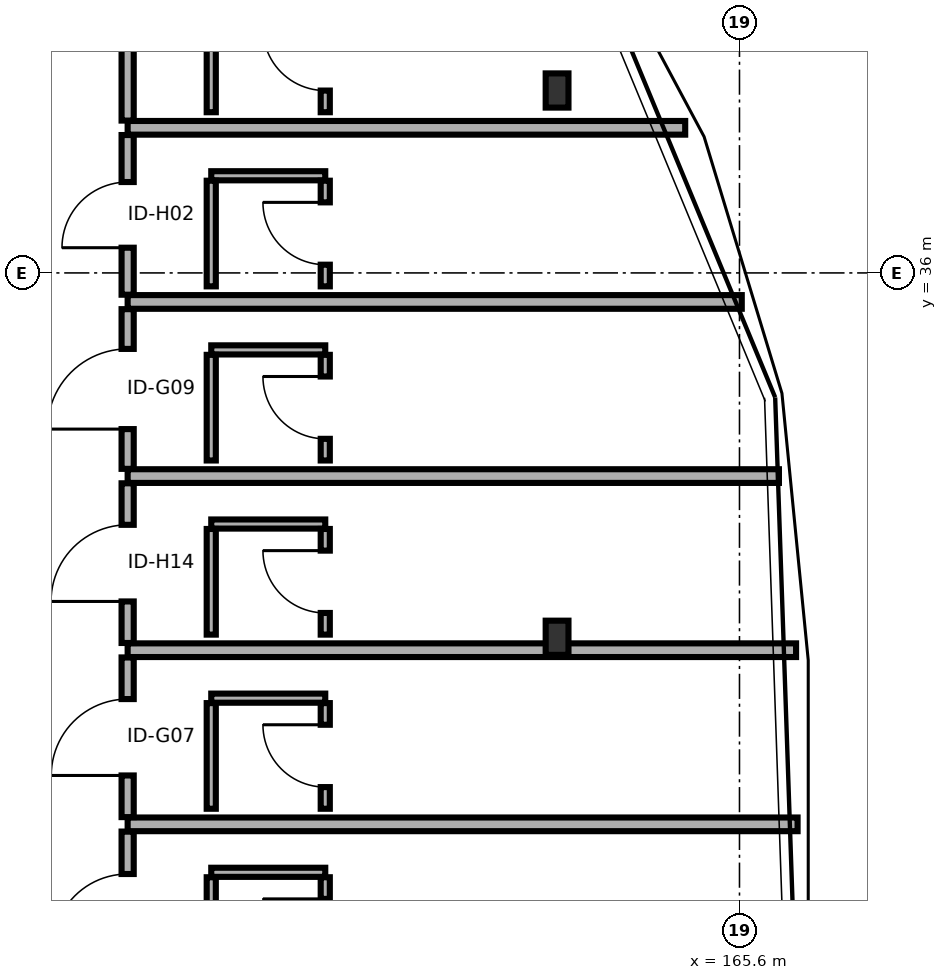
"""IFC4 building model, lengths in metres.
Left out: names, types, materials, properties, quantities, classifications, styles, units other than length and angle.
Written with IfcOpenShell. Run it as: python <this file> out.ifc"""

import sys

from ifc_helpers import new_model, si_unit, direction, frame, frame_2d, origin, origin_2d, place, context, subcontext, project, spatial, rectangle, i_section, extrude, element, fill, save


model = new_model("IFC4")
c1 = context("Model", 3, precision=1e-05, world=origin(), true_north=direction((0.0, 1.0)))
c2 = subcontext(c1, "Body", "Model", "MODEL_VIEW")
j1 = project(units=[si_unit("LENGTHUNIT", "METRE"), si_unit("PLANEANGLEUNIT", "RADIAN")], contexts=[c1])
p1 = place(None, origin())
s1 = spatial("IfcSite", under=j1, at=p1, CompositionType="ELEMENT")
p2 = place(p1, origin())
s2 = spatial("IfcBuilding", under=s1, at=p2, CompositionType="ELEMENT")
p3 = place(p2, frame((0.0, 0.0, 28.3)))
s3 = spatial("IfcBuildingStorey", under=s2, at=p3, CompositionType="ELEMENT", Elevation=28.3)
for number, where, z_axis, x_axis in (
    (1, (163.2, 31.2, 0.0), (0.0, 0.0, 1.0), (1.0, 0.0, 0.0)),
    (2, (163.2, 38.4, 0.0), (0.0, 0.0, 1.0), (1.0, 0.0, 0.0)),
):
    element("IfcColumn", number, at=place(p3, frame(where, z_axis=z_axis, x_axis=x_axis)), inside=s3, PredefinedType="COLUMN", context=c2, shape_type="SweptSolid", body=[
        extrude(i_section(OverallWidth=0.3, OverallDepth=0.45, WebThickness=0.014, FlangeThickness=0.026, FilletRadius=0.027, at=origin_2d()), origin(), (0.0, 0.0, 1.0), 3.4),
    ])
p4 = place(p3, frame((157.55, 26.55, 0.0), z_axis=(0.0, 0.0, 1.0), x_axis=(0.0, 1.0, 0.0)))
e3 = element("IfcWall", 3, at=p4, inside=s3, PredefinedType="PARTITIONING", context=c2, shape_type="SweptSolid", body=[
    extrude(rectangle(XDim=2.101, YDim=0.16, at=frame_2d((1.05, 0.0))), origin(), (0.0, 0.0, 1.0), 3.175),
])
p5 = place(p4, frame((0.559, 0.0, 0.0)))
e4 = element("IfcOpeningElement", 4, at=p5, cuts=e3, PredefinedType="OPENING", context=c2, shape_type="SweptSolid", body=[
    extrude(rectangle(XDim=0.984, YDim=2.07, at=frame_2d((0.492, 1.035))), frame((0.0, 0.09, 0.0), z_axis=(0.0, -1.0, 0.0), x_axis=(1.0, 0.0, 0.0)), (0.0, 0.0, 1.0), 0.18),
])
p6 = place(p3, frame((158.65, 28.115, 0.0), z_axis=(0.0, 0.0, 1.0), x_axis=(1.0, 0.0, 0.0)))
e5 = element("IfcWall", 5, at=p6, inside=s3, PredefinedType="PARTITIONING", context=c2, shape_type="SweptSolid", body=[
    extrude(rectangle(XDim=1.5, YDim=0.12, at=frame_2d((0.75, 0.0))), origin(), (0.0, 0.0, 1.0), 3.175),
])
p7 = place(p3, frame((158.65, 26.659, 0.0), z_axis=(0.0, 0.0, 1.0), x_axis=(0.0, 1.0, 0.0)))
e6 = element("IfcWall", 6, at=p7, inside=s3, PredefinedType="PARTITIONING", context=c2, shape_type="SweptSolid", body=[
    extrude(rectangle(XDim=1.39, YDim=0.12, at=frame_2d((0.695, 0.0))), origin(), (0.0, 0.0, 1.0), 3.175),
])
p8 = place(p3, frame((160.15, 26.659, 0.0), z_axis=(0.0, 0.0, 1.0), x_axis=(0.0, 1.0, 0.0)))
e7 = element("IfcWall", 7, at=p8, inside=s3, PredefinedType="PARTITIONING", context=c2, shape_type="SweptSolid", body=[
    extrude(rectangle(XDim=1.39, YDim=0.12, at=frame_2d((0.695, 0.0))), origin(), (0.0, 0.0, 1.0), 3.175),
])
p9 = place(p8, frame((0.285, 0.0, 0.0)))
e8 = element("IfcOpeningElement", 8, at=p9, cuts=e7, PredefinedType="OPENING", context=c2, shape_type="SweptSolid", body=[
    extrude(rectangle(XDim=0.82, YDim=2.08, at=frame_2d((0.41, 1.04))), frame((0.0, 0.07, 0.0), z_axis=(0.0, -1.0, 0.0), x_axis=(1.0, 0.0, 0.0)), (0.0, 0.0, 1.0), 0.14),
])
p10 = place(p3, frame((157.55, 28.746, 0.0), z_axis=(0.0, 0.0, 1.0), x_axis=(1.0, 0.0, 0.0)))
e9 = element("IfcWall", 9, at=p10, inside=s3, PredefinedType="PARTITIONING", context=c2, shape_type="SweptSolid", body=[
    extrude(rectangle(XDim=8.814, YDim=0.18, at=frame_2d((4.407, 0.0))), origin(), (0.0, 0.0, 1.0), 2.66),
])
p11 = place(p3, frame((157.55, 28.841, 0.0), z_axis=(0.0, 0.0, 1.0), x_axis=(0.0, 1.0, 0.0)))
e10 = element("IfcWall", 10, at=p11, inside=s3, PredefinedType="PARTITIONING", context=c2, shape_type="SweptSolid", body=[
    extrude(rectangle(XDim=2.101, YDim=0.16, at=frame_2d((1.05, 0.0))), origin(), (0.0, 0.0, 1.0), 3.175),
])
p12 = place(p11, frame((0.548, 0.0, 0.0)))
e11 = element("IfcOpeningElement", 11, at=p12, cuts=e10, PredefinedType="OPENING", context=c2, shape_type="SweptSolid", body=[
    extrude(rectangle(XDim=1.005, YDim=2.05, at=frame_2d((0.502, 1.025))), frame((0.0, 0.09, 0.0), z_axis=(0.0, -1.0, 0.0), x_axis=(1.0, 0.0, 0.0)), (0.0, 0.0, 1.0), 0.18),
])
p13 = place(p3, frame((158.65, 30.406, 0.0), z_axis=(0.0, 0.0, 1.0), x_axis=(1.0, 0.0, 0.0)))
e12 = element("IfcWall", 12, at=p13, inside=s3, PredefinedType="PARTITIONING", context=c2, shape_type="SweptSolid", body=[
    extrude(rectangle(XDim=1.5, YDim=0.12, at=frame_2d((0.75, 0.0))), origin(), (0.0, 0.0, 1.0), 3.175),
])
p14 = place(p3, frame((158.65, 28.95, 0.0), z_axis=(0.0, 0.0, 1.0), x_axis=(0.0, 1.0, 0.0)))
e13 = element("IfcWall", 13, at=p14, inside=s3, PredefinedType="PARTITIONING", context=c2, shape_type="SweptSolid", body=[
    extrude(rectangle(XDim=1.39, YDim=0.12, at=frame_2d((0.695, 0.0))), origin(), (0.0, 0.0, 1.0), 3.175),
])
p15 = place(p3, frame((160.15, 28.95, 0.0), z_axis=(0.0, 0.0, 1.0), x_axis=(0.0, 1.0, 0.0)))
e14 = element("IfcWall", 14, at=p15, inside=s3, PredefinedType="PARTITIONING", context=c2, shape_type="SweptSolid", body=[
    extrude(rectangle(XDim=1.39, YDim=0.12, at=frame_2d((0.695, 0.0))), origin(), (0.0, 0.0, 1.0), 3.175),
])
p16 = place(p15, frame((0.285, 0.0, 0.0)))
e15 = element("IfcOpeningElement", 15, at=p16, cuts=e14, PredefinedType="OPENING", context=c2, shape_type="SweptSolid", body=[
    extrude(rectangle(XDim=0.82, YDim=2.08, at=frame_2d((0.41, 1.04))), frame((0.0, 0.07, 0.0), z_axis=(0.0, -1.0, 0.0), x_axis=(1.0, 0.0, 0.0)), (0.0, 0.0, 1.0), 0.14),
])
p17 = place(p3, frame((157.55, 31.036, 0.0), z_axis=(0.0, 0.0, 1.0), x_axis=(1.0, 0.0, 0.0)))
e16 = element("IfcWall", 16, at=p17, inside=s3, PredefinedType="PARTITIONING", context=c2, shape_type="SweptSolid", body=[
    extrude(rectangle(XDim=8.794, YDim=0.18, at=frame_2d((4.397, 0.0))), origin(), (0.0, 0.0, 1.0), 2.66),
])
p18 = place(p3, frame((157.55, 31.131, 0.0), z_axis=(0.0, 0.0, 1.0), x_axis=(0.0, 1.0, 0.0)))
e17 = element("IfcWall", 17, at=p18, inside=s3, PredefinedType="PARTITIONING", context=c2, shape_type="SweptSolid", body=[
    extrude(rectangle(XDim=2.101, YDim=0.16, at=frame_2d((1.051, 0.0))), origin(), (0.0, 0.0, 1.0), 2.71),
])
p19 = place(p18, frame((0.546, 0.0, 0.0)))
e18 = element("IfcOpeningElement", 18, at=p19, cuts=e17, PredefinedType="OPENING", context=c2, shape_type="SweptSolid", body=[
    extrude(rectangle(XDim=1.008, YDim=2.13, at=frame_2d((0.504, 1.065))), frame((0.0, 0.09, 0.0), z_axis=(0.0, -1.0, 0.0), x_axis=(1.0, 0.0, 0.0)), (0.0, 0.0, 1.0), 0.18),
])
p20 = place(p3, frame((158.65, 32.696, 0.0), z_axis=(0.0, 0.0, 1.0), x_axis=(1.0, 0.0, 0.0)))
e19 = element("IfcWall", 19, at=p20, inside=s3, PredefinedType="PARTITIONING", context=c2, shape_type="SweptSolid", body=[
    extrude(rectangle(XDim=1.5, YDim=0.12, at=frame_2d((0.75, 0.0))), origin(), (0.0, 0.0, 1.0), 3.175),
])
p21 = place(p3, frame((158.65, 31.241, 0.0), z_axis=(0.0, 0.0, 1.0), x_axis=(0.0, 1.0, 0.0)))
e20 = element("IfcWall", 20, at=p21, inside=s3, PredefinedType="PARTITIONING", context=c2, shape_type="SweptSolid", body=[
    extrude(rectangle(XDim=1.39, YDim=0.12, at=frame_2d((0.695, 0.0))), origin(), (0.0, 0.0, 1.0), 2.71),
])
p22 = place(p3, frame((160.15, 31.241, 0.0), z_axis=(0.0, 0.0, 1.0), x_axis=(0.0, 1.0, 0.0)))
e21 = element("IfcWall", 21, at=p22, inside=s3, PredefinedType="PARTITIONING", context=c2, shape_type="SweptSolid", body=[
    extrude(rectangle(XDim=1.39, YDim=0.12, at=frame_2d((0.695, 0.0))), origin(), (0.0, 0.0, 1.0), 2.71),
])
p23 = place(p22, frame((0.285, 0.0, 0.0)))
e22 = element("IfcOpeningElement", 22, at=p23, cuts=e21, PredefinedType="OPENING", context=c2, shape_type="SweptSolid", body=[
    extrude(rectangle(XDim=0.82, YDim=2.08, at=frame_2d((0.41, 1.04))), frame((0.0, 0.07, 0.0), z_axis=(0.0, -1.0, 0.0), x_axis=(1.0, 0.0, 0.0)), (0.0, 0.0, 1.0), 0.14),
])
p24 = place(p3, frame((157.55, 33.327, 0.0), z_axis=(0.0, 0.0, 1.0), x_axis=(1.0, 0.0, 0.0)))
e23 = element("IfcWall", 23, at=p24, inside=s3, PredefinedType="PARTITIONING", context=c2, shape_type="SweptSolid", body=[
    extrude(rectangle(XDim=8.569, YDim=0.18, at=frame_2d((4.284, 0.0))), origin(), (0.0, 0.0, 1.0), 2.66),
])
p25 = place(p3, frame((157.55, 33.422, 0.0), z_axis=(0.0, 0.0, 1.0), x_axis=(0.0, 1.0, 0.0)))
e24 = element("IfcWall", 24, at=p25, inside=s3, PredefinedType="PARTITIONING", context=c2, shape_type="SweptSolid", body=[
    extrude(rectangle(XDim=2.101, YDim=0.16, at=frame_2d((1.05, 0.0))), origin(), (0.0, 0.0, 1.0), 3.175),
])
p26 = place(p25, frame((0.523, 0.0, 0.0)))
e25 = element("IfcOpeningElement", 25, at=p26, cuts=e24, PredefinedType="OPENING", context=c2, shape_type="SweptSolid", body=[
    extrude(rectangle(XDim=1.055, YDim=2.05, at=frame_2d((0.527, 1.025))), frame((0.0, 0.09, 0.0), z_axis=(0.0, -1.0, 0.0), x_axis=(1.0, 0.0, 0.0)), (0.0, 0.0, 1.0), 0.18),
])
p27 = place(p3, frame((158.65, 34.987, 0.0), z_axis=(0.0, 0.0, 1.0), x_axis=(1.0, 0.0, 0.0)))
e26 = element("IfcWall", 26, at=p27, inside=s3, PredefinedType="PARTITIONING", context=c2, shape_type="SweptSolid", body=[
    extrude(rectangle(XDim=1.5, YDim=0.12, at=frame_2d((0.75, 0.0))), origin(), (0.0, 0.0, 1.0), 3.175),
])
p28 = place(p3, frame((158.65, 33.532, 0.0), z_axis=(0.0, 0.0, 1.0), x_axis=(0.0, 1.0, 0.0)))
e27 = element("IfcWall", 27, at=p28, inside=s3, PredefinedType="PARTITIONING", context=c2, shape_type="SweptSolid", body=[
    extrude(rectangle(XDim=1.39, YDim=0.12, at=frame_2d((0.695, 0.0))), origin(), (0.0, 0.0, 1.0), 3.175),
])
p29 = place(p3, frame((160.15, 33.532, 0.0), z_axis=(0.0, 0.0, 1.0), x_axis=(0.0, 1.0, 0.0)))
e28 = element("IfcWall", 28, at=p29, inside=s3, PredefinedType="PARTITIONING", context=c2, shape_type="SweptSolid", body=[
    extrude(rectangle(XDim=1.39, YDim=0.12, at=frame_2d((0.695, 0.0))), origin(), (0.0, 0.0, 1.0), 3.175),
])
p30 = place(p29, frame((0.285, 0.0, 0.0)))
e29 = element("IfcOpeningElement", 29, at=p30, cuts=e28, PredefinedType="OPENING", context=c2, shape_type="SweptSolid", body=[
    extrude(rectangle(XDim=0.82, YDim=2.08, at=frame_2d((0.41, 1.04))), frame((0.0, 0.07, 0.0), z_axis=(0.0, -1.0, 0.0), x_axis=(1.0, 0.0, 0.0)), (0.0, 0.0, 1.0), 0.14),
])
p31 = place(p3, frame((157.55, 35.618, 0.0), z_axis=(0.0, 0.0, 1.0), x_axis=(1.0, 0.0, 0.0)))
e30 = element("IfcWall", 30, at=p31, inside=s3, PredefinedType="PARTITIONING", context=c2, shape_type="SweptSolid", body=[
    extrude(rectangle(XDim=8.08, YDim=0.18, at=frame_2d((4.04, 0.0))), origin(), (0.0, 0.0, 1.0), 2.66),
])
p32 = place(p3, frame((157.55, 35.713, 0.0), z_axis=(0.0, 0.0, 1.0), x_axis=(0.0, 1.0, 0.0)))
e31 = element("IfcWall", 31, at=p32, inside=s3, PredefinedType="PARTITIONING", context=c2, shape_type="SweptSolid", body=[
    extrude(rectangle(XDim=2.101, YDim=0.16, at=frame_2d((1.051, 0.0))), origin(), (0.0, 0.0, 1.0), 3.175),
])
p33 = place(p32, frame((0.618, 0.0, 0.0)))
e32 = element("IfcOpeningElement", 32, at=p33, cuts=e31, PredefinedType="OPENING", context=c2, shape_type="SweptSolid", body=[
    extrude(rectangle(XDim=0.864, YDim=2.13, at=frame_2d((0.432, 1.065))), frame((0.0, 0.09, 0.0), z_axis=(0.0, -1.0, 0.0), x_axis=(1.0, 0.0, 0.0)), (0.0, 0.0, 1.0), 0.18),
])
p34 = place(p3, frame((158.65, 37.278, 0.0), z_axis=(0.0, 0.0, 1.0), x_axis=(1.0, 0.0, 0.0)))
e33 = element("IfcWall", 33, at=p34, inside=s3, PredefinedType="PARTITIONING", context=c2, shape_type="SweptSolid", body=[
    extrude(rectangle(XDim=1.5, YDim=0.12, at=frame_2d((0.75, 0.0))), origin(), (0.0, 0.0, 1.0), 3.175),
])
p35 = place(p3, frame((158.65, 35.823, 0.0), z_axis=(0.0, 0.0, 1.0), x_axis=(0.0, 1.0, 0.0)))
e34 = element("IfcWall", 34, at=p35, inside=s3, PredefinedType="PARTITIONING", context=c2, shape_type="SweptSolid", body=[
    extrude(rectangle(XDim=1.39, YDim=0.12, at=frame_2d((0.695, 0.0))), origin(), (0.0, 0.0, 1.0), 3.175),
])
p36 = place(p3, frame((160.15, 35.823, 0.0), z_axis=(0.0, 0.0, 1.0), x_axis=(0.0, 1.0, 0.0)))
e35 = element("IfcWall", 35, at=p36, inside=s3, PredefinedType="PARTITIONING", context=c2, shape_type="SweptSolid", body=[
    extrude(rectangle(XDim=1.39, YDim=0.12, at=frame_2d((0.695, 0.0))), origin(), (0.0, 0.0, 1.0), 3.175),
])
p37 = place(p36, frame((0.285, 0.0, 0.0)))
e36 = element("IfcOpeningElement", 36, at=p37, cuts=e35, PredefinedType="OPENING", context=c2, shape_type="SweptSolid", body=[
    extrude(rectangle(XDim=0.82, YDim=2.08, at=frame_2d((0.41, 1.04))), frame((0.0, 0.07, 0.0), z_axis=(0.0, -1.0, 0.0), x_axis=(1.0, 0.0, 0.0)), (0.0, 0.0, 1.0), 0.14),
])
p38 = place(p3, frame((157.55, 37.909, 0.0), z_axis=(0.0, 0.0, 1.0), x_axis=(1.0, 0.0, 0.0)))
e37 = element("IfcWall", 37, at=p38, inside=s3, PredefinedType="PARTITIONING", context=c2, shape_type="SweptSolid", body=[
    extrude(rectangle(XDim=7.336, YDim=0.18, at=frame_2d((3.668, 0.0))), origin(), (0.0, 0.0, 1.0), 2.66),
])
p39 = place(p3, frame((157.55, 38.004, 0.0), z_axis=(0.0, 0.0, 1.0), x_axis=(0.0, 1.0, 0.0)))
e38 = element("IfcWall", 38, at=p39, inside=s3, PredefinedType="PARTITIONING", context=c2, shape_type="SweptSolid", body=[
    extrude(rectangle(XDim=2.101, YDim=0.16, at=frame_2d((1.05, 0.0))), origin(), (0.0, 0.0, 1.0), 2.71),
])
p40 = place(p39, frame((1.086, 0.0, 0.0)))
e39 = element("IfcOpeningElement", 39, at=p40, cuts=e38, PredefinedType="OPENING", context=c2, shape_type="SweptSolid", body=[
    extrude(rectangle(XDim=0.855, YDim=2.05, at=frame_2d((0.427, 1.025))), frame((0.0, 0.09, 0.0), z_axis=(0.0, -1.0, 0.0), x_axis=(1.0, 0.0, 0.0)), (0.0, 0.0, 1.0), 0.18),
])
p41 = place(p3, frame((158.65, 38.114, 0.0), z_axis=(0.0, 0.0, 1.0), x_axis=(0.0, 1.0, 0.0)))
e40 = element("IfcWall", 40, at=p41, inside=s3, PredefinedType="PARTITIONING", context=c2, shape_type="SweptSolid", body=[
    extrude(rectangle(XDim=1.39, YDim=0.12, at=frame_2d((0.695, 0.0))), origin(), (0.0, 0.0, 1.0), 2.71),
])
p42 = place(p3, frame((160.15, 38.114, 0.0), z_axis=(0.0, 0.0, 1.0), x_axis=(0.0, 1.0, 0.0)))
e41 = element("IfcWall", 41, at=p42, inside=s3, PredefinedType="PARTITIONING", context=c2, shape_type="SweptSolid", body=[
    extrude(rectangle(XDim=1.39, YDim=0.12, at=frame_2d((0.695, 0.0))), origin(), (0.0, 0.0, 1.0), 2.71),
])
p43 = place(p42, frame((0.285, 0.0, 0.0)))
e42 = element("IfcOpeningElement", 42, at=p43, cuts=e41, PredefinedType="OPENING", context=c2, shape_type="SweptSolid", body=[
    extrude(rectangle(XDim=0.82, YDim=2.08, at=frame_2d((0.41, 1.04))), frame((0.0, 0.07, 0.0), z_axis=(0.0, -1.0, 0.0), x_axis=(1.0, 0.0, 0.0)), (0.0, 0.0, 1.0), 0.14),
])
p44 = place(p5, origin())
e43 = element("IfcDoor", 43, at=p44, inside=s3, OperationType="SINGLE_SWING_LEFT", PredefinedType="DOOR", context=c2, shape_type="SweptSolid", body=[
    extrude(rectangle(XDim=0.984, YDim=2.07, at=frame_2d((0.492, 1.035))), frame((0.0, 0.025, 0.0), z_axis=(0.0, -1.0, 0.0), x_axis=(1.0, 0.0, 0.0)), (0.0, 0.0, 1.0), 0.05),
])
fill(e4, e43)
p45 = place(p9, origin())
e44 = element("IfcDoor", 44, at=p45, inside=s3, OperationType="SINGLE_SWING_RIGHT", PredefinedType="DOOR", context=c2, shape_type="SweptSolid", body=[
    extrude(rectangle(XDim=0.82, YDim=2.08, at=frame_2d((0.41, 1.04))), frame((0.0, 0.025, 0.0), z_axis=(0.0, -1.0, 0.0), x_axis=(1.0, 0.0, 0.0)), (0.0, 0.0, 1.0), 0.05),
])
fill(e8, e44)
p46 = place(p12, origin())
e45 = element("IfcDoor", 45, at=p46, inside=s3, OperationType="SINGLE_SWING_LEFT", PredefinedType="DOOR", context=c2, shape_type="SweptSolid", body=[
    extrude(rectangle(XDim=1.005, YDim=2.05, at=frame_2d((0.502, 1.025))), frame((0.0, 0.025, 0.0), z_axis=(0.0, -1.0, 0.0), x_axis=(1.0, 0.0, 0.0)), (0.0, 0.0, 1.0), 0.05),
])
fill(e11, e45)
p47 = place(p16, origin())
e46 = element("IfcDoor", 46, at=p47, inside=s3, OperationType="SINGLE_SWING_RIGHT", PredefinedType="DOOR", context=c2, shape_type="SweptSolid", body=[
    extrude(rectangle(XDim=0.82, YDim=2.08, at=frame_2d((0.41, 1.04))), frame((0.0, 0.025, 0.0), z_axis=(0.0, -1.0, 0.0), x_axis=(1.0, 0.0, 0.0)), (0.0, 0.0, 1.0), 0.05),
])
fill(e15, e46)
p48 = place(p19, origin())
e47 = element("IfcDoor", 47, at=p48, inside=s3, OperationType="SINGLE_SWING_LEFT", PredefinedType="DOOR", context=c2, shape_type="SweptSolid", body=[
    extrude(rectangle(XDim=1.008, YDim=2.13, at=frame_2d((0.504, 1.065))), frame((0.0, 0.025, 0.0), z_axis=(0.0, -1.0, 0.0), x_axis=(1.0, 0.0, 0.0)), (0.0, 0.0, 1.0), 0.05),
])
fill(e18, e47)
p49 = place(p23, origin())
e48 = element("IfcDoor", 48, at=p49, inside=s3, OperationType="SINGLE_SWING_RIGHT", PredefinedType="DOOR", context=c2, shape_type="SweptSolid", body=[
    extrude(rectangle(XDim=0.82, YDim=2.08, at=frame_2d((0.41, 1.04))), frame((0.0, 0.025, 0.0), z_axis=(0.0, -1.0, 0.0), x_axis=(1.0, 0.0, 0.0)), (0.0, 0.0, 1.0), 0.05),
])
fill(e22, e48)
p50 = place(p26, origin())
e49 = element("IfcDoor", 49, at=p50, inside=s3, OperationType="SINGLE_SWING_LEFT", PredefinedType="DOOR", context=c2, shape_type="SweptSolid", body=[
    extrude(rectangle(XDim=1.055, YDim=2.05, at=frame_2d((0.527, 1.025))), frame((0.0, 0.025, 0.0), z_axis=(0.0, -1.0, 0.0), x_axis=(1.0, 0.0, 0.0)), (0.0, 0.0, 1.0), 0.05),
])
fill(e25, e49)
p51 = place(p30, origin())
e50 = element("IfcDoor", 50, at=p51, inside=s3, OperationType="SINGLE_SWING_RIGHT", PredefinedType="DOOR", context=c2, shape_type="SweptSolid", body=[
    extrude(rectangle(XDim=0.82, YDim=2.08, at=frame_2d((0.41, 1.04))), frame((0.0, 0.025, 0.0), z_axis=(0.0, -1.0, 0.0), x_axis=(1.0, 0.0, 0.0)), (0.0, 0.0, 1.0), 0.05),
])
fill(e29, e50)
p52 = place(p33, origin())
e51 = element("IfcDoor", 51, at=p52, inside=s3, OperationType="SINGLE_SWING_LEFT", PredefinedType="DOOR", context=c2, shape_type="SweptSolid", body=[
    extrude(rectangle(XDim=0.864, YDim=2.13, at=frame_2d((0.432, 1.065))), frame((0.0, 0.025, 0.0), z_axis=(0.0, -1.0, 0.0), x_axis=(1.0, 0.0, 0.0)), (0.0, 0.0, 1.0), 0.05),
])
fill(e32, e51)
p53 = place(p37, origin())
e52 = element("IfcDoor", 52, at=p53, inside=s3, OperationType="SINGLE_SWING_RIGHT", PredefinedType="DOOR", context=c2, shape_type="SweptSolid", body=[
    extrude(rectangle(XDim=0.82, YDim=2.08, at=frame_2d((0.41, 1.04))), frame((0.0, 0.025, 0.0), z_axis=(0.0, -1.0, 0.0), x_axis=(1.0, 0.0, 0.0)), (0.0, 0.0, 1.0), 0.05),
])
fill(e36, e52)
p54 = place(p43, origin())
e53 = element("IfcDoor", 53, at=p54, inside=s3, OperationType="SINGLE_SWING_RIGHT", PredefinedType="DOOR", context=c2, shape_type="SweptSolid", body=[
    extrude(rectangle(XDim=0.82, YDim=2.08, at=frame_2d((0.41, 1.04))), frame((0.0, 0.025, 0.0), z_axis=(0.0, -1.0, 0.0), x_axis=(1.0, 0.0, 0.0)), (0.0, 0.0, 1.0), 0.05),
])
fill(e42, e53)
save(model, sys.argv[1])
